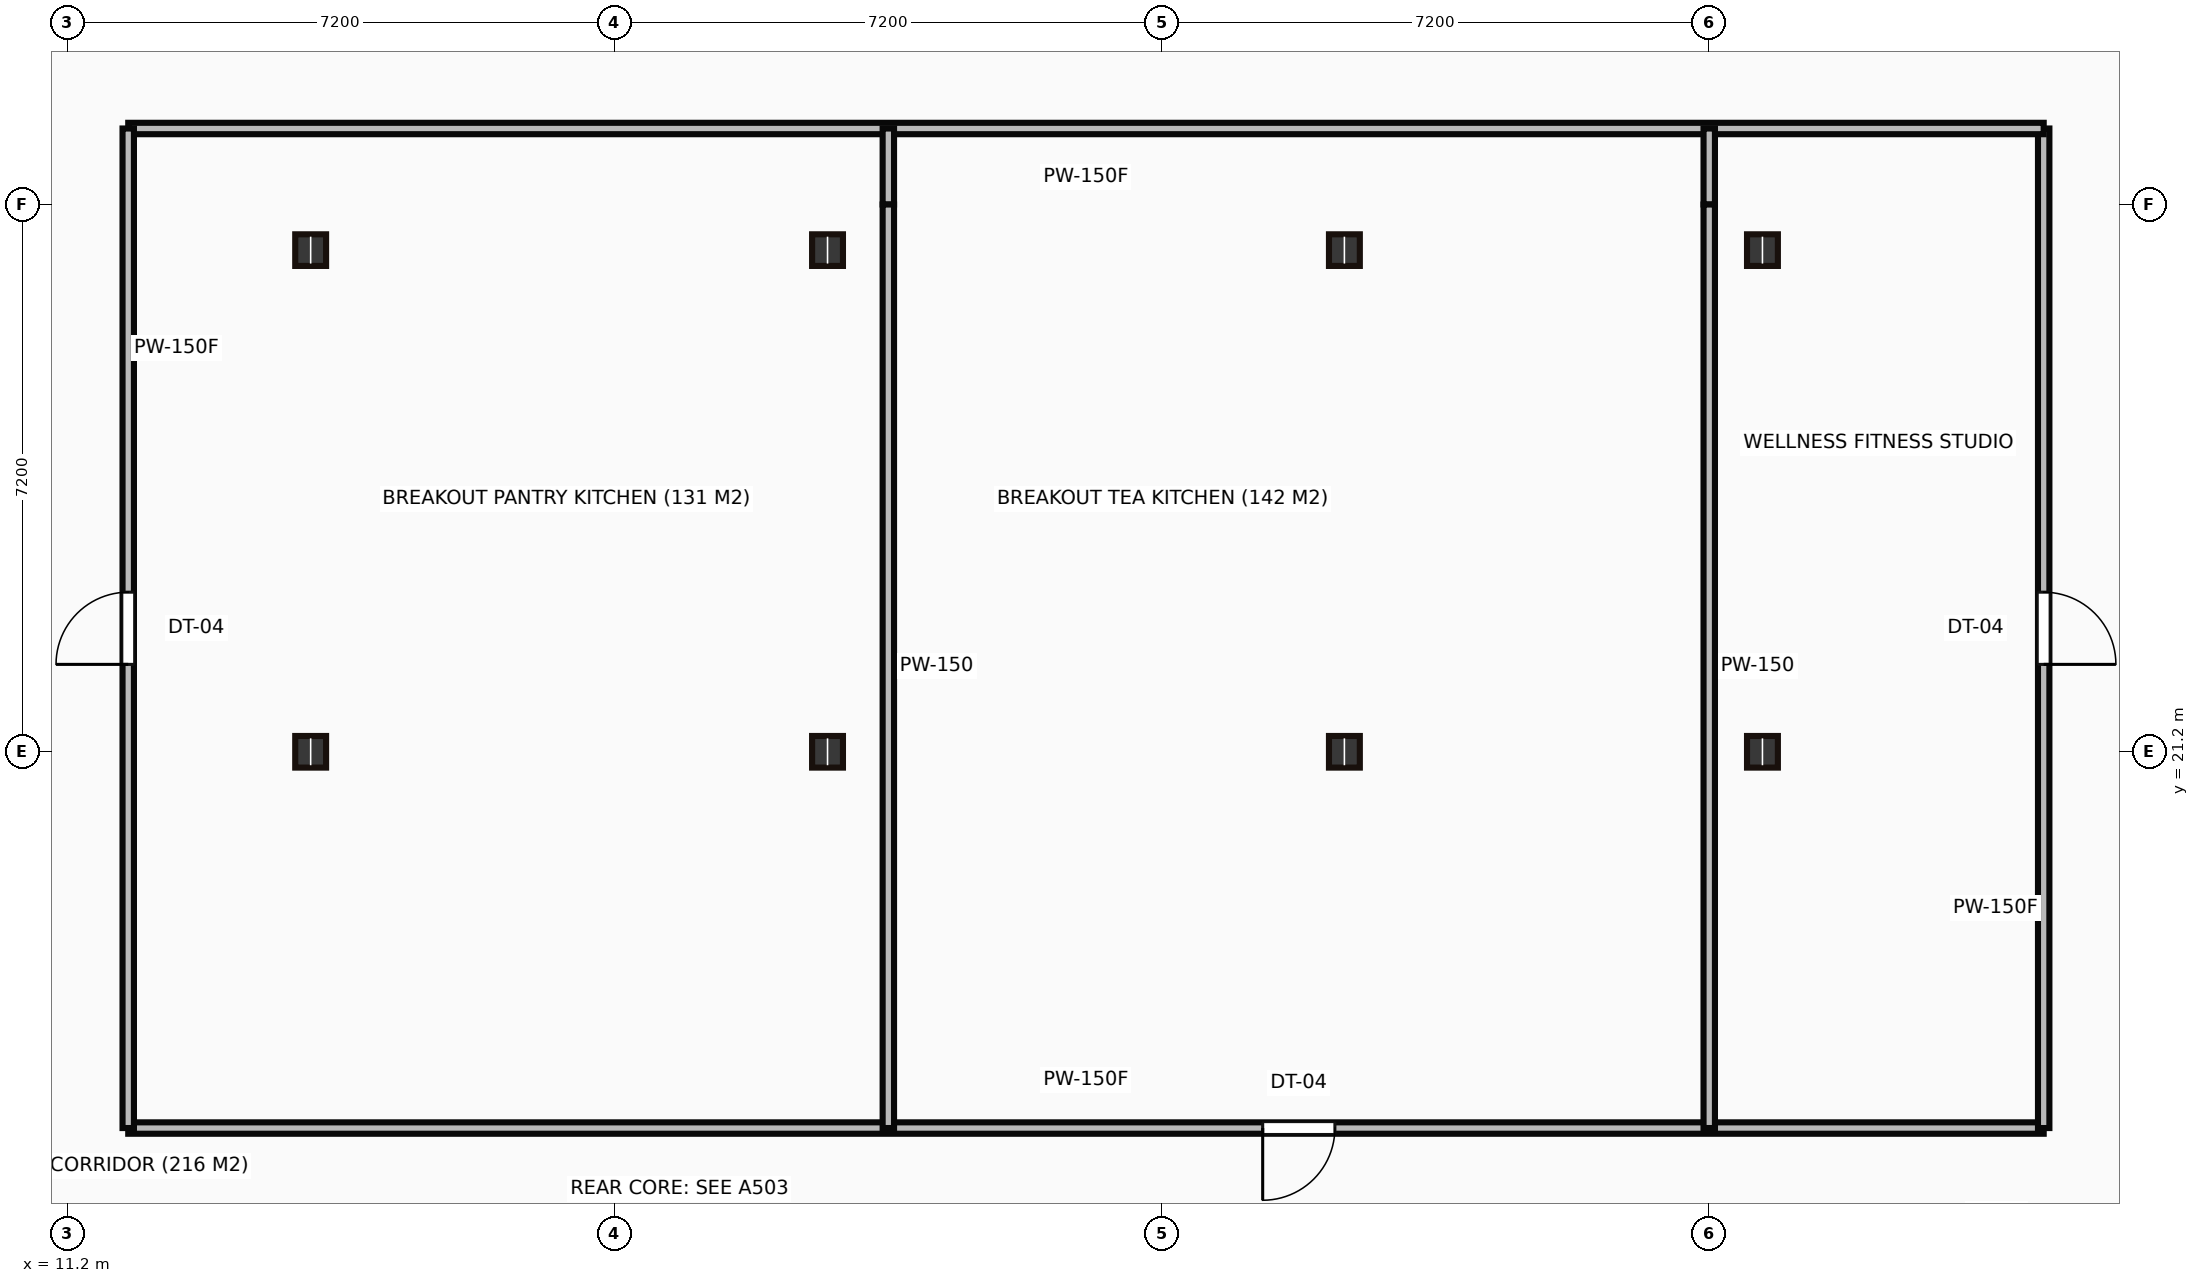
"""IFC4 building model, lengths in metres.
Left out: names, types, materials, properties, quantities, classifications, styles, units other than length and angle.
Written with IfcOpenShell. Run it as: python <this file> out.ifc"""

import sys

from ifc_helpers import new_model, si_unit, direction, frame, frame_2d, origin, origin_2d, place, context, subcontext, project, spatial, rectangle, i_section, extrude, source, transform, mapped, element, fill, save


model = new_model("IFC4")
c1 = context("Model", 3, precision=1e-05, world=origin(), true_north=direction((0.0, 1.0)))
c2 = subcontext(c1, "Body", "Model", "MODEL_VIEW")
j1 = project(units=[si_unit("LENGTHUNIT", "METRE"), si_unit("PLANEANGLEUNIT", "RADIAN")], contexts=[c1])
p1 = place(None, origin())
s1 = spatial("IfcSite", under=j1, at=p1, CompositionType="ELEMENT")
p2 = place(p1, origin())
s2 = spatial("IfcBuilding", under=s1, at=p2, CompositionType="ELEMENT")
p3 = place(p2, frame((0.0, 0.0, 54.4)))
s3 = spatial("IfcBuildingStorey", under=s2, at=p3, CompositionType="ELEMENT", Elevation=54.4)
m1 = source(origin(), c2, "Body", "SweptSolid", [
    extrude(i_section(OverallWidth=0.406, OverallDepth=0.416, WebThickness=0.03, FlangeThickness=0.048, at=origin_2d()), origin(), (0.0, 0.0, 1.0), 3.65),
])
for number, where, z_axis, x_axis in (
    (1, (14.4, 21.2, 0.0), (0.0, 0.0, 1.0), (1.0, 0.0, 0.0)),
    (2, (14.4, 27.8, 0.0), (0.0, 0.0, 1.0), (1.0, 0.0, 0.0)),
    (3, (21.2, 21.2, 0.0), (0.0, 0.0, 1.0), (1.0, 0.0, 0.0)),
    (4, (21.2, 27.8, 0.0), (0.0, 0.0, 1.0), (1.0, 0.0, 0.0)),
    (5, (28.0, 21.2, 0.0), (0.0, 0.0, 1.0), (1.0, 0.0, 0.0)),
    (6, (28.0, 27.8, 0.0), (0.0, 0.0, 1.0), (1.0, 0.0, 0.0)),
    (7, (33.5, 21.2, 0.0), (0.0, 0.0, 1.0), (1.0, 0.0, 0.0)),
    (8, (33.5, 27.8, 0.0), (0.0, 0.0, 1.0), (1.0, 0.0, 0.0)),
):
    element("IfcColumn", number, at=place(p3, frame(where, z_axis=z_axis, x_axis=x_axis)), inside=s3, PredefinedType="COLUMN", context=c2, shape_type="MappedRepresentation", body=[
        mapped(m1, transform((0.0, 0.0, 0.0))),
    ])
m2 = source(origin(), c2, "Body", "SweptSolid", [
    extrude(rectangle(XDim=25.2, YDim=0.15, at=frame_2d((12.6, 0.0))), origin(), (0.0, 0.0, 1.0), 3.4),
])
p4 = place(p3, frame((12.0, 16.25, 0.0), z_axis=(0.0, 0.0, 1.0), x_axis=(1.0, 0.0, 0.0)))
e9 = element("IfcWall", 9, at=p4, inside=s3, PredefinedType="PARTITIONING", context=c2, shape_type="MappedRepresentation", body=[
    mapped(m2, transform((0.0, 0.0, 0.0))),
])
p5 = place(p4, frame((14.925, 0.0, 0.0)))
e10 = element("IfcOpeningElement", 10, at=p5, cuts=e9, PredefinedType="OPENING", context=c2, shape_type="SweptSolid", body=[
    extrude(rectangle(XDim=0.95, YDim=2.15, at=frame_2d((0.475, 1.075))), frame((0.0, 0.085, 0.0), z_axis=(0.0, -1.0, 0.0), x_axis=(1.0, 0.0, 0.0)), (0.0, 0.0, 1.0), 0.17),
])
m3 = source(origin(), c2, "Body", "SweptSolid", [
    extrude(rectangle(XDim=13.15, YDim=0.15, at=frame_2d((6.575, 0.0))), origin(), (0.0, 0.0, 1.0), 3.4),
])
p6 = place(p3, frame((37.2, 16.25, 0.0), z_axis=(0.0, 0.0, 1.0), x_axis=(0.0, 1.0, 0.0)))
e11 = element("IfcWall", 11, at=p6, inside=s3, PredefinedType="PARTITIONING", context=c2, shape_type="MappedRepresentation", body=[
    mapped(m3, transform((0.0, 0.0, 0.0))),
])
p7 = place(p6, frame((6.1, 0.0, 0.0)))
e12 = element("IfcOpeningElement", 12, at=p7, cuts=e11, PredefinedType="OPENING", context=c2, shape_type="SweptSolid", body=[
    extrude(rectangle(XDim=0.95, YDim=2.15, at=frame_2d((0.475, 1.075))), frame((0.0, 0.085, 0.0), z_axis=(0.0, -1.0, 0.0), x_axis=(1.0, 0.0, 0.0)), (0.0, 0.0, 1.0), 0.17),
])
p8 = place(p3, frame((37.2, 29.4, 0.0), z_axis=(0.0, 0.0, 1.0), x_axis=(-1.0, 0.0, 0.0)))
e13 = element("IfcWall", 13, at=p8, inside=s3, PredefinedType="PARTITIONING", context=c2, shape_type="MappedRepresentation", body=[
    mapped(m2, transform((0.0, 0.0, 0.0))),
])
p9 = place(p3, frame((12.0, 29.4, 0.0), z_axis=(0.0, 0.0, 1.0), x_axis=(0.0, -1.0, 0.0)))
e14 = element("IfcWall", 14, at=p9, inside=s3, PredefinedType="PARTITIONING", context=c2, shape_type="MappedRepresentation", body=[
    mapped(m3, transform((0.0, 0.0, 0.0))),
])
p10 = place(p9, frame((6.1, 0.0, 0.0)))
e15 = element("IfcOpeningElement", 15, at=p10, cuts=e14, PredefinedType="OPENING", context=c2, shape_type="SweptSolid", body=[
    extrude(rectangle(XDim=0.95, YDim=2.15, at=frame_2d((0.475, 1.075))), frame((0.0, 0.085, 0.0), z_axis=(0.0, -1.0, 0.0), x_axis=(1.0, 0.0, 0.0)), (0.0, 0.0, 1.0), 0.17),
])
m4 = source(origin(), c2, "Body", "SweptSolid", [
    extrude(rectangle(XDim=1.0, YDim=0.15, at=frame_2d((0.5, 0.0))), origin(), (0.0, 0.0, 1.0), 3.4),
])
p11 = place(p3, frame((22.0, 29.4, 0.0), z_axis=(0.0, 0.0, 1.0), x_axis=(0.0, -1.0, 0.0)))
e16 = element("IfcWall", 16, at=p11, inside=s3, PredefinedType="PARTITIONING", context=c2, shape_type="MappedRepresentation", body=[
    mapped(m4, transform((0.0, 0.0, 0.0))),
])
m5 = source(origin(), c2, "Body", "SweptSolid", [
    extrude(rectangle(XDim=12.15, YDim=0.15, at=frame_2d((6.075, 0.0))), origin(), (0.0, 0.0, 1.0), 3.4),
])
p12 = place(p3, frame((22.0, 28.4, 0.0), z_axis=(0.0, 0.0, 1.0), x_axis=(0.0, -1.0, 0.0)))
e17 = element("IfcWall", 17, at=p12, inside=s3, PredefinedType="PARTITIONING", context=c2, shape_type="MappedRepresentation", body=[
    mapped(m5, transform((0.0, 0.0, 0.0))),
])
p13 = place(p3, frame((32.8, 29.4, 0.0), z_axis=(0.0, 0.0, 1.0), x_axis=(0.0, -1.0, 0.0)))
e18 = element("IfcWall", 18, at=p13, inside=s3, PredefinedType="PARTITIONING", context=c2, shape_type="MappedRepresentation", body=[
    mapped(m4, transform((0.0, 0.0, 0.0))),
])
p14 = place(p3, frame((32.8, 28.4, 0.0), z_axis=(0.0, 0.0, 1.0), x_axis=(0.0, -1.0, 0.0)))
e19 = element("IfcWall", 19, at=p14, inside=s3, PredefinedType="PARTITIONING", context=c2, shape_type="MappedRepresentation", body=[
    mapped(m5, transform((0.0, 0.0, 0.0))),
])
m6 = source(origin(), c2, "Body", "SweptSolid", [
    extrude(rectangle(XDim=0.95, YDim=2.15, at=frame_2d((0.475, 1.075))), frame((0.0, 0.025, 0.0), z_axis=(0.0, -1.0, 0.0), x_axis=(1.0, 0.0, 0.0)), (0.0, 0.0, 1.0), 0.05),
])
p15 = place(p10, origin())
e20 = element("IfcDoor", 20, at=p15, inside=s3, OperationType="SINGLE_SWING_RIGHT", PredefinedType="DOOR", context=c2, shape_type="MappedRepresentation", body=[
    mapped(m6, transform((0.0, 0.0, 0.0))),
])
fill(e15, e20)
p16 = place(p5, origin())
e21 = element("IfcDoor", 21, at=p16, inside=s3, OperationType="SINGLE_SWING_LEFT", PredefinedType="DOOR", context=c2, shape_type="MappedRepresentation", body=[
    mapped(m6, transform((0.0, 0.0, 0.0))),
])
fill(e10, e21)
p17 = place(p7, origin())
e22 = element("IfcDoor", 22, at=p17, inside=s3, OperationType="SINGLE_SWING_LEFT", PredefinedType="DOOR", context=c2, shape_type="MappedRepresentation", body=[
    mapped(m6, transform((0.0, 0.0, 0.0))),
])
fill(e12, e22)
save(model, sys.argv[1])
